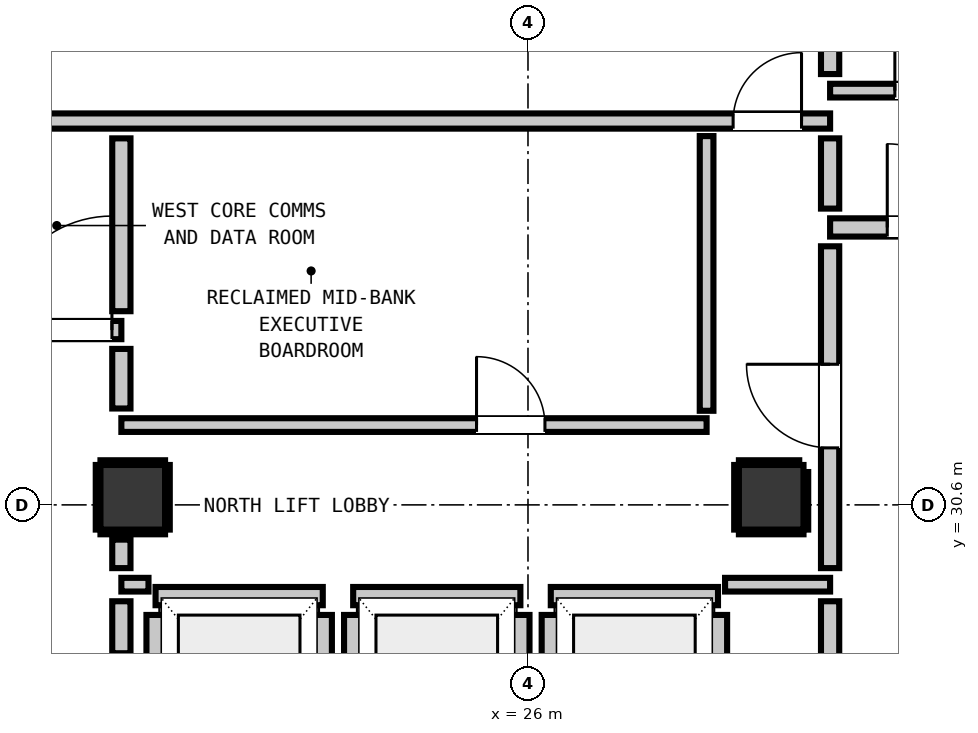
"""IFC4 building model, lengths in metres.
Left out: names, types, materials, properties, quantities, classifications, styles, units other than length and angle.
Written with IfcOpenShell. Run it as: python <this file> out.ifc"""

import sys

from ifc_helpers import new_model, si_unit, direction, frame, frame_2d, origin, origin_2d, place, context, subcontext, project, spatial, rectangle, extrude, element, fill, save


model = new_model("IFC4")
c1 = context("Model", 3, precision=1e-05, world=origin(), true_north=direction((0.0, 1.0)))
c2 = subcontext(c1, "Body", "Model", "MODEL_VIEW")
j1 = project(units=[si_unit("LENGTHUNIT", "METRE"), si_unit("PLANEANGLEUNIT", "RADIAN")], contexts=[c1])
p1 = place(None, origin())
s1 = spatial("IfcSite", under=j1, at=p1, CompositionType="ELEMENT")
p2 = place(p1, origin())
s2 = spatial("IfcBuilding", under=s1, at=p2, CompositionType="ELEMENT")
p3 = place(p2, frame((0.0, 0.0, 180.2)))
s3 = spatial("IfcBuildingStorey", under=s2, at=p3, CompositionType="ELEMENT", Elevation=180.2)
for number, where, z_axis, x_axis in (
    (1, (20.8, 30.7, 0.0), (0.0, 0.0, 1.0), (1.0, 0.0, 0.0)),
    (2, (29.2, 30.7, 0.0), (0.0, 0.0, 1.0), (1.0, 0.0, 0.0)),
):
    element("IfcColumn", number, at=place(p3, frame(where, z_axis=z_axis, x_axis=x_axis)), inside=s3, PredefinedType="COLUMN", context=c2, shape_type="SweptSolid", body=[
        extrude(rectangle(XDim=0.85, YDim=0.85, at=origin_2d()), origin(), (0.0, 0.0, 1.0), 3.32),
    ])
p4 = place(p3, frame((21.1, 29.4, 0.0), z_axis=(0.0, 0.0, 1.0), x_axis=(1.0, 0.0, 0.0)))
e3 = element("IfcWall", 3, at=p4, inside=s3, PredefinedType="PARTITIONING", context=c2, shape_type="SweptSolid", body=[
    extrude(rectangle(XDim=2.2, YDim=0.24, at=frame_2d((1.1, 0.0))), origin(), (0.0, 0.0, 1.0), 3.08),
])
p5 = place(p3, frame((21.1, 27.048, 0.0), z_axis=(0.0, 0.0, 1.0), x_axis=(0.0, 1.0, 0.0)))
e4 = element("IfcWall", 4, at=p5, inside=s3, PredefinedType="PARTITIONING", context=c2, shape_type="SweptSolid", body=[
    extrude(rectangle(XDim=2.104, YDim=0.24, at=frame_2d((1.052, 0.0))), origin(), (0.0, 0.0, 1.0), 2.315),
])
p6 = place(p3, frame((23.3, 27.048, 0.0), z_axis=(0.0, 0.0, 1.0), x_axis=(0.0, 1.0, 0.0)))
e5 = element("IfcWall", 5, at=p6, inside=s3, PredefinedType="PARTITIONING", context=c2, shape_type="SweptSolid", body=[
    extrude(rectangle(XDim=2.104, YDim=0.24, at=frame_2d((1.052, 0.0))), origin(), (0.0, 0.0, 1.0), 3.08),
])
p7 = place(p3, frame((23.7, 29.4, 0.0), z_axis=(0.0, 0.0, 1.0), x_axis=(1.0, 0.0, 0.0)))
e6 = element("IfcWall", 6, at=p7, inside=s3, PredefinedType="PARTITIONING", context=c2, shape_type="SweptSolid", body=[
    extrude(rectangle(XDim=2.2, YDim=0.24, at=frame_2d((1.1, 0.0))), origin(), (0.0, 0.0, 1.0), 3.08),
])
for number, where, z_axis, x_axis in (
    (7, (23.7, 27.048, 0.0), (0.0, 0.0, 1.0), (0.0, 1.0, 0.0)),
    (8, (25.9, 27.048, 0.0), (0.0, 0.0, 1.0), (0.0, 1.0, 0.0)),
):
    element("IfcWall", number, at=place(p3, frame(where, z_axis=z_axis, x_axis=x_axis)), inside=s3, PredefinedType="PARTITIONING", context=c2, shape_type="SweptSolid", body=[
        extrude(rectangle(XDim=2.104, YDim=0.24, at=frame_2d((1.052, 0.0))), origin(), (0.0, 0.0, 1.0), 3.08),
    ])
p8 = place(p3, frame((26.3, 29.4, 0.0), z_axis=(0.0, 0.0, 1.0), x_axis=(1.0, 0.0, 0.0)))
e9 = element("IfcWall", 9, at=p8, inside=s3, PredefinedType="PARTITIONING", context=c2, shape_type="SweptSolid", body=[
    extrude(rectangle(XDim=2.2, YDim=0.24, at=frame_2d((1.1, 0.0))), origin(), (0.0, 0.0, 1.0), 3.08),
])
p9 = place(p3, frame((26.3, 27.048, 0.0), z_axis=(0.0, 0.0, 1.0), x_axis=(0.0, 1.0, 0.0)))
e10 = element("IfcWall", 10, at=p9, inside=s3, PredefinedType="PARTITIONING", context=c2, shape_type="SweptSolid", body=[
    extrude(rectangle(XDim=2.104, YDim=0.24, at=frame_2d((1.052, 0.0))), origin(), (0.0, 0.0, 1.0), 3.08),
])
p10 = place(p3, frame((28.5, 27.33, 0.0), z_axis=(0.0, 0.0, 1.0), x_axis=(0.0, 1.0, 0.0)))
e11 = element("IfcWall", 11, at=p10, inside=s3, PredefinedType="PARTITIONING", context=c2, shape_type="SweptSolid", body=[
    extrude(rectangle(XDim=1.822, YDim=0.24, at=frame_2d((0.911, 0.0))), origin(), (0.0, 0.0, 1.0), 3.08),
])
p11 = place(p3, frame((17.45, 32.9, 0.0), z_axis=(0.0, 0.0, 1.0), x_axis=(1.0, 0.0, 0.0)))
e12 = element("IfcWall", 12, at=p11, inside=s3, PredefinedType="PARTITIONING", context=c2, shape_type="SweptSolid", body=[
    extrude(rectangle(XDim=3.2, YDim=0.24, at=frame_2d((1.6, 0.0))), origin(), (0.0, 0.0, 1.0), 3.08),
])
p12 = place(p11, frame((0.159, 0.0, 0.0)))
e13 = element("IfcOpeningElement", 13, at=p12, cuts=e12, PredefinedType="OPENING", context=c2, shape_type="SweptSolid", body=[
    extrude(rectangle(XDim=1.1, YDim=2.15, at=frame_2d((0.55, 1.075))), frame((0.0, 0.13, 0.0), z_axis=(0.0, -1.0, 0.0), x_axis=(1.0, 0.0, 0.0)), (0.0, 0.0, 1.0), 0.26),
])
p13 = place(p11, frame((1.576, 0.0, 0.0)))
e14 = element("IfcOpeningElement", 14, at=p13, cuts=e12, PredefinedType="OPENING", context=c2, shape_type="SweptSolid", body=[
    extrude(rectangle(XDim=1.5, YDim=2.15, at=frame_2d((0.75, 1.075))), frame((0.0, 0.13, 0.0), z_axis=(0.0, -1.0, 0.0), x_axis=(1.0, 0.0, 0.0)), (0.0, 0.0, 1.0), 0.26),
])
p14 = place(p3, frame((29.975, 34.25, 0.0), z_axis=(0.0, 0.0, 1.0), x_axis=(1.0, 0.0, 0.0)))
e15 = element("IfcWall", 15, at=p14, inside=s3, PredefinedType="PARTITIONING", context=c2, shape_type="SweptSolid", body=[
    extrude(rectangle(XDim=2.475, YDim=0.24, at=frame_2d((1.237, 0.0))), origin(), (0.0, 0.0, 1.0), 3.08),
])
p15 = place(p14, frame((0.752, 0.0, 0.0)))
e16 = element("IfcOpeningElement", 16, at=p15, cuts=e15, PredefinedType="OPENING", context=c2, shape_type="SweptSolid", body=[
    extrude(rectangle(XDim=1.1, YDim=2.15, at=frame_2d((0.55, 1.075))), frame((0.0, 0.13, 0.0), z_axis=(0.0, -1.0, 0.0), x_axis=(1.0, 0.0, 0.0)), (0.0, 0.0, 1.0), 0.26),
])
p16 = place(p3, frame((18.95, 35.65, 0.0), z_axis=(0.0, 0.0, 1.0), x_axis=(1.0, 0.0, 0.0)))
e17 = element("IfcWall", 17, at=p16, inside=s3, PredefinedType="PARTITIONING", context=c2, shape_type="SweptSolid", body=[
    extrude(rectangle(XDim=11.025, YDim=0.2, at=frame_2d((5.513, 0.0))), origin(), (0.0, 0.0, 1.0), 3.08),
])
p17 = place(p16, frame((9.749, 0.0, 0.0)))
e18 = element("IfcOpeningElement", 18, at=p17, cuts=e17, PredefinedType="OPENING", context=c2, shape_type="SweptSolid", body=[
    extrude(rectangle(XDim=0.9, YDim=2.1, at=frame_2d((0.45, 1.05))), frame((0.0, 0.11, 0.0), z_axis=(0.0, -1.0, 0.0), x_axis=(1.0, 0.0, 0.0)), (0.0, 0.0, 1.0), 0.22),
])
p18 = place(p3, frame((20.65, 29.55, 0.0), z_axis=(0.0, 0.0, 1.0), x_axis=(1.0, 0.0, 0.0)))
e19 = element("IfcWall", 19, at=p18, inside=s3, PredefinedType="PARTITIONING", context=c2, shape_type="SweptSolid", body=[
    extrude(rectangle(XDim=0.357, YDim=0.18, at=frame_2d((0.179, 0.0))), origin(), (0.0, 0.0, 1.0), 3.08),
])
p19 = place(p3, frame((28.593, 29.55, 0.0), z_axis=(0.0, 0.0, 1.0), x_axis=(1.0, 0.0, 0.0)))
e20 = element("IfcWall", 20, at=p19, inside=s3, PredefinedType="PARTITIONING", context=c2, shape_type="SweptSolid", body=[
    extrude(rectangle(XDim=1.382, YDim=0.18, at=frame_2d((0.691, 0.0))), origin(), (0.0, 0.0, 1.0), 3.08),
])
p20 = place(p3, frame((20.65, 31.65, 0.0), z_axis=(0.0, 0.0, 1.0), x_axis=(1.0, 0.0, 0.0)))
e21 = element("IfcWall", 21, at=p20, inside=s3, PredefinedType="PARTITIONING", context=c2, shape_type="SweptSolid", body=[
    extrude(rectangle(XDim=7.7, YDim=0.18, at=frame_2d((3.85, 0.0))), origin(), (0.0, 0.0, 1.0), 3.08),
])
p21 = place(p20, frame((4.673, 0.0, 0.0)))
e22 = element("IfcOpeningElement", 22, at=p21, cuts=e21, PredefinedType="OPENING", context=c2, shape_type="SweptSolid", body=[
    extrude(rectangle(XDim=0.9, YDim=2.1, at=frame_2d((0.45, 1.05))), frame((0.0, 0.1, 0.0), z_axis=(0.0, -1.0, 0.0), x_axis=(1.0, 0.0, 0.0)), (0.0, 0.0, 1.0), 0.2),
])
p22 = place(p3, frame((29.975, 36.05, 0.0), z_axis=(0.0, 0.0, 1.0), x_axis=(1.0, 0.0, 0.0)))
e23 = element("IfcWall", 23, at=p22, inside=s3, PredefinedType="PARTITIONING", context=c2, shape_type="SweptSolid", body=[
    extrude(rectangle(XDim=2.505, YDim=0.18, at=frame_2d((1.252, 0.0))), origin(), (0.0, 0.0, 1.0), 3.08),
])
p23 = place(p22, frame((0.852, 0.0, 0.0)))
e24 = element("IfcOpeningElement", 24, at=p23, cuts=e23, PredefinedType="OPENING", context=c2, shape_type="SweptSolid", body=[
    extrude(rectangle(XDim=0.9, YDim=2.1, at=frame_2d((0.45, 1.05))), frame((0.0, 0.1, 0.0), z_axis=(0.0, -1.0, 0.0), x_axis=(1.0, 0.0, 0.0)), (0.0, 0.0, 1.0), 0.2),
])
p24 = place(p3, frame((20.65, 28.648, 0.0), z_axis=(0.0, 0.0, 1.0), x_axis=(0.0, 1.0, 0.0)))
e25 = element("IfcWall", 25, at=p24, inside=s3, PredefinedType="PARTITIONING", context=c2, shape_type="SweptSolid", body=[
    extrude(rectangle(XDim=0.684, YDim=0.24, at=frame_2d((0.342, 0.0))), origin(), (0.0, 0.0, 1.0), 2.315),
])
p25 = place(p3, frame((20.65, 29.768, 0.0), z_axis=(0.0, 0.0, 1.0), x_axis=(0.0, 1.0, 0.0)))
e26 = element("IfcWall", 26, at=p25, inside=s3, PredefinedType="PARTITIONING", context=c2, shape_type="SweptSolid", body=[
    extrude(rectangle(XDim=0.375, YDim=0.24, at=frame_2d((0.188, 0.0))), origin(), (0.0, 0.0, 1.0), 2.315),
])
p26 = place(p3, frame((20.65, 31.868, 0.0), z_axis=(0.0, 0.0, 1.0), x_axis=(0.0, 1.0, 0.0)))
e27 = element("IfcWall", 27, at=p26, inside=s3, PredefinedType="PARTITIONING", context=c2, shape_type="SweptSolid", body=[
    extrude(rectangle(XDim=0.784, YDim=0.24, at=frame_2d((0.392, 0.0))), origin(), (0.0, 0.0, 1.0), 2.315),
])
p27 = place(p3, frame((20.65, 33.148, 0.0), z_axis=(0.0, 0.0, 1.0), x_axis=(0.0, 1.0, 0.0)))
e28 = element("IfcWall", 28, at=p27, inside=s3, PredefinedType="PARTITIONING", context=c2, shape_type="SweptSolid", body=[
    extrude(rectangle(XDim=2.274, YDim=0.24, at=frame_2d((1.137, 0.0))), origin(), (0.0, 0.0, 1.0), 2.315),
])
p28 = place(p3, frame((29.975, 25.648, 0.0), z_axis=(0.0, 0.0, 1.0), x_axis=(0.0, 1.0, 0.0)))
e29 = element("IfcWall", 29, at=p28, inside=s3, PredefinedType="PARTITIONING", context=c2, shape_type="SweptSolid", body=[
    extrude(rectangle(XDim=3.684, YDim=0.24, at=frame_2d((1.842, 0.0))), origin(), (0.0, 0.0, 1.0), 3.08),
])
p29 = place(p3, frame((29.975, 29.768, 0.0), z_axis=(0.0, 0.0, 1.0), x_axis=(0.0, 1.0, 0.0)))
e30 = element("IfcWall", 30, at=p29, inside=s3, PredefinedType="PARTITIONING", context=c2, shape_type="SweptSolid", body=[
    extrude(rectangle(XDim=4.234, YDim=0.24, at=frame_2d((2.117, 0.0))), origin(), (0.0, 0.0, 1.0), 3.08),
])
p30 = place(p29, frame((1.582, 0.0, 0.0)))
e31 = element("IfcOpeningElement", 31, at=p30, cuts=e30, PredefinedType="OPENING", context=c2, shape_type="SweptSolid", body=[
    extrude(rectangle(XDim=1.1, YDim=2.15, at=frame_2d((0.55, 1.075))), frame((0.0, 0.13, 0.0), z_axis=(0.0, -1.0, 0.0), x_axis=(1.0, 0.0, 0.0)), (0.0, 0.0, 1.0), 0.26),
])
p31 = place(p3, frame((29.975, 34.498, 0.0), z_axis=(0.0, 0.0, 1.0), x_axis=(0.0, 1.0, 0.0)))
e32 = element("IfcWall", 32, at=p31, inside=s3, PredefinedType="PARTITIONING", context=c2, shape_type="SweptSolid", body=[
    extrude(rectangle(XDim=0.924, YDim=0.24, at=frame_2d((0.462, 0.0))), origin(), (0.0, 0.0, 1.0), 3.08),
])
p32 = place(p3, frame((29.975, 36.268, 0.0), z_axis=(0.0, 0.0, 1.0), x_axis=(0.0, 1.0, 0.0)))
e33 = element("IfcWall", 33, at=p32, inside=s3, PredefinedType="PARTITIONING", context=c2, shape_type="SweptSolid", body=[
    extrude(rectangle(XDim=2.294, YDim=0.24, at=frame_2d((1.147, 0.0))), origin(), (0.0, 0.0, 1.0), 3.08),
])
p33 = place(p3, frame((28.35, 31.838, 0.0), z_axis=(0.0, 0.0, 1.0), x_axis=(0.0, 1.0, 0.0)))
e34 = element("IfcWall", 34, at=p33, inside=s3, PredefinedType="PARTITIONING", context=c2, shape_type="SweptSolid", body=[
    extrude(rectangle(XDim=3.614, YDim=0.18, at=frame_2d((1.807, 0.0))), origin(), (0.0, 0.0, 1.0), 3.08),
])
for number, where, z_axis, x_axis in (
    (35, (20.375, 30.243, 0.0), (0.0, 0.0, 1.0), (1.0, 0.0, 0.0)),
    (36, (20.375, 31.157, 0.0), (0.0, 0.0, 1.0), (1.0, 0.0, 0.0)),
    (37, (20.343, 30.275, 0.0), (0.0, 0.0, 1.0), (0.0, 1.0, 0.0)),
    (38, (21.257, 30.275, 0.0), (0.0, 0.0, 1.0), (0.0, 1.0, 0.0)),
    (39, (28.775, 30.243, 0.0), (0.0, 0.0, 1.0), (1.0, 0.0, 0.0)),
):
    element("IfcWall", number, at=place(p3, frame(where, z_axis=z_axis, x_axis=x_axis)), inside=s3, PredefinedType="PARTITIONING", context=c2, shape_type="SweptSolid", body=[
        extrude(rectangle(XDim=0.85, YDim=0.06, at=frame_2d((0.425, 0.0))), origin(), (0.0, 0.0, 1.0), 1.45),
    ])
p34 = place(p3, frame((28.775, 31.157, 0.0), z_axis=(0.0, 0.0, 1.0), x_axis=(1.0, 0.0, 0.0)))
e40 = element("IfcWall", 40, at=p34, inside=s3, PredefinedType="PARTITIONING", context=c2, shape_type="SweptSolid", body=[
    extrude(rectangle(XDim=0.794, YDim=0.06, at=frame_2d((0.397, 0.0))), origin(), (0.0, 0.0, 1.0), 1.45),
])
p35 = place(p3, frame((28.743, 30.275, 0.0), z_axis=(0.0, 0.0, 1.0), x_axis=(0.0, 1.0, 0.0)))
e41 = element("IfcWall", 41, at=p35, inside=s3, PredefinedType="PARTITIONING", context=c2, shape_type="SweptSolid", body=[
    extrude(rectangle(XDim=0.85, YDim=0.06, at=frame_2d((0.425, 0.0))), origin(), (0.0, 0.0, 1.0), 1.45),
])
p36 = place(p3, frame((29.657, 30.275, 0.0), z_axis=(0.0, 0.0, 1.0), x_axis=(0.0, 1.0, 0.0)))
e42 = element("IfcWall", 42, at=p36, inside=s3, PredefinedType="PARTITIONING", context=c2, shape_type="SweptSolid", body=[
    extrude(rectangle(XDim=0.757, YDim=0.06, at=frame_2d((0.378, 0.0))), origin(), (0.0, 0.0, 1.0), 1.45),
])
p37 = place(p30, origin())
e43 = element("IfcDoor", 43, at=p37, inside=s3, OperationType="SINGLE_SWING_RIGHT", PredefinedType="DOOR", context=c2, shape_type="SweptSolid", body=[
    extrude(rectangle(XDim=1.1, YDim=2.15, at=frame_2d((0.55, 1.075))), frame((0.0, 0.025, 0.0), z_axis=(0.0, -1.0, 0.0), x_axis=(1.0, 0.0, 0.0)), (0.0, 0.0, 1.0), 0.05),
])
fill(e31, e43)
p38 = place(p15, origin())
e44 = element("IfcDoor", 44, at=p38, inside=s3, OperationType="SINGLE_SWING_LEFT", PredefinedType="DOOR", context=c2, shape_type="SweptSolid", body=[
    extrude(rectangle(XDim=1.1, YDim=2.15, at=frame_2d((0.55, 1.075))), frame((0.0, 0.025, 0.0), z_axis=(0.0, -1.0, 0.0), x_axis=(1.0, 0.0, 0.0)), (0.0, 0.0, 1.0), 0.05),
])
fill(e16, e44)
p39 = place(p13, origin())
e45 = element("IfcDoor", 45, at=p39, inside=s3, OperationType="SINGLE_SWING_RIGHT", PredefinedType="DOOR", context=c2, shape_type="SweptSolid", body=[
    extrude(rectangle(XDim=1.5, YDim=2.15, at=frame_2d((0.75, 1.075))), frame((0.0, 0.025, 0.0), z_axis=(0.0, -1.0, 0.0), x_axis=(1.0, 0.0, 0.0)), (0.0, 0.0, 1.0), 0.05),
])
fill(e14, e45)
p40 = place(p23, origin())
e46 = element("IfcDoor", 46, at=p40, inside=s3, OperationType="SINGLE_SWING_LEFT", PredefinedType="DOOR", context=c2, shape_type="SweptSolid", body=[
    extrude(rectangle(XDim=0.9, YDim=2.1, at=frame_2d((0.45, 1.05))), frame((0.0, 0.025, 0.0), z_axis=(0.0, -1.0, 0.0), x_axis=(1.0, 0.0, 0.0)), (0.0, 0.0, 1.0), 0.05),
])
fill(e24, e46)
p41 = place(p17, origin())
e47 = element("IfcDoor", 47, at=p41, inside=s3, OperationType="SINGLE_SWING_RIGHT", PredefinedType="DOOR", context=c2, shape_type="SweptSolid", body=[
    extrude(rectangle(XDim=0.9, YDim=2.1, at=frame_2d((0.45, 1.05))), frame((0.0, 0.025, 0.0), z_axis=(0.0, -1.0, 0.0), x_axis=(1.0, 0.0, 0.0)), (0.0, 0.0, 1.0), 0.05),
])
fill(e18, e47)
p42 = place(p21, origin())
e48 = element("IfcDoor", 48, at=p42, inside=s3, OperationType="SINGLE_SWING_LEFT", PredefinedType="DOOR", context=c2, shape_type="SweptSolid", body=[
    extrude(rectangle(XDim=0.9, YDim=2.1, at=frame_2d((0.45, 1.05))), frame((0.0, 0.025, 0.0), z_axis=(0.0, -1.0, 0.0), x_axis=(1.0, 0.0, 0.0)), (0.0, 0.0, 1.0), 0.05),
])
fill(e22, e48)
save(model, sys.argv[1])
